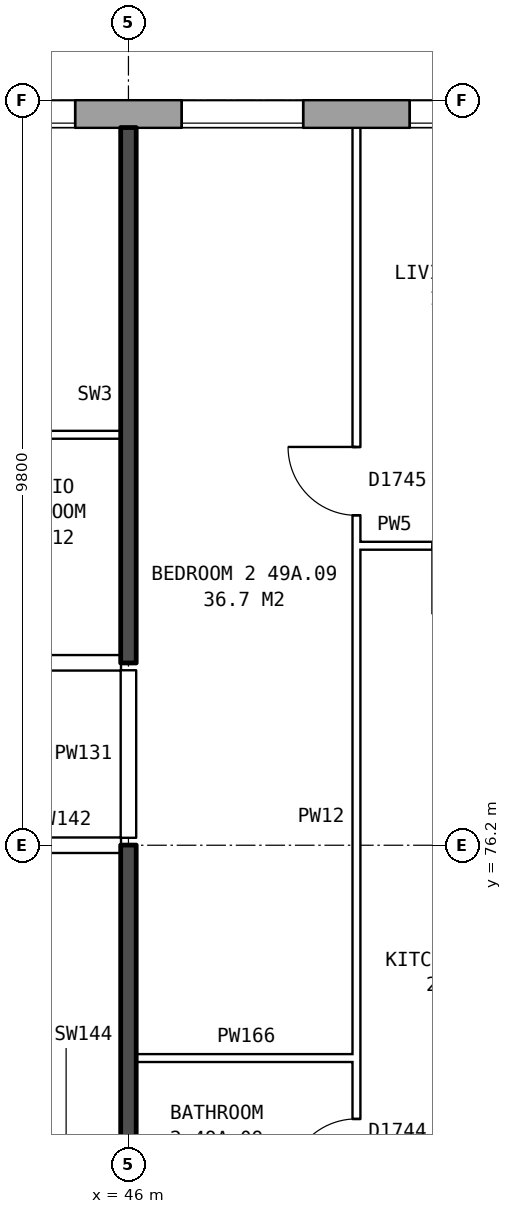
"""IFC4 building model, lengths in metres.
Left out: names, types, materials, properties, quantities, classifications, styles, units other than length and angle.
Written with IfcOpenShell. Run it as: python <this file> out.ifc"""

import sys

from ifc_helpers import new_model, si_unit, direction, frame, frame_2d, origin, place, context, subcontext, project, spatial, rectangle, extrude, element, fill, save


model = new_model("IFC4")
c1 = context("Model", 3, precision=1e-05, world=origin(), true_north=direction((0.0, 1.0)))
c2 = subcontext(c1, "Body", "Model", "MODEL_VIEW")
j1 = project(units=[si_unit("LENGTHUNIT", "METRE"), si_unit("PLANEANGLEUNIT", "RADIAN")], contexts=[c1])
p1 = place(None, origin())
s1 = spatial("IfcSite", under=j1, at=p1, CompositionType="ELEMENT")
p2 = place(p1, origin())
s2 = spatial("IfcBuilding", under=s1, at=p2, CompositionType="ELEMENT")
p3 = place(p2, frame((0.0, 0.0, 175.8)))
s3 = spatial("IfcBuildingStorey", under=s2, at=p3, CompositionType="ELEMENT", Elevation=175.8)
p4 = place(p3, frame((72.925, 85.82, 0.0), z_axis=(0.0, 0.0, 1.0), x_axis=(-1.0, 0.0, 0.0)))
e1 = element("IfcWall", 1, at=p4, inside=s3, PredefinedType="STANDARD", context=c2, shape_type="SweptSolid", body=[
    extrude(rectangle(XDim=39.601, YDim=0.36, at=frame_2d((19.8, 0.0))), origin(), (0.0, 0.0, 1.0), 2.85),
])
p5 = place(p4, frame((0.3, 0.0, 0.8)))
e2 = element("IfcOpeningElement", 2, at=p5, cuts=e1, PredefinedType="OPENING", context=c2, shape_type="SweptSolid", body=[
    extrude(rectangle(XDim=1.2, YDim=1.8, at=frame_2d((0.6, 0.9))), frame((0.0, 0.19, 0.0), z_axis=(0.0, -1.0, 0.0), x_axis=(1.0, 0.0, 0.0)), (0.0, 0.0, 1.0), 0.38),
])
p6 = place(p4, frame((3.675, 0.0, 0.8)))
e3 = element("IfcOpeningElement", 3, at=p6, cuts=e1, PredefinedType="OPENING", context=c2, shape_type="SweptSolid", body=[
    extrude(rectangle(XDim=0.6, YDim=0.9, at=frame_2d((0.3, 0.45))), frame((0.0, 0.19, 0.0), z_axis=(0.0, -1.0, 0.0), x_axis=(1.0, 0.0, 0.0)), (0.0, 0.0, 1.0), 0.38),
])
p7 = place(p4, frame((6.625, 0.0, 0.8)))
e4 = element("IfcOpeningElement", 4, at=p7, cuts=e1, PredefinedType="OPENING", context=c2, shape_type="SweptSolid", body=[
    extrude(rectangle(XDim=1.6, YDim=1.8, at=frame_2d((0.8, 0.9))), frame((0.0, 0.19, 0.0), z_axis=(0.0, -1.0, 0.0), x_axis=(1.0, 0.0, 0.0)), (0.0, 0.0, 1.0), 0.38),
])
p8 = place(p4, frame((9.625, 0.0, 0.8)))
e5 = element("IfcOpeningElement", 5, at=p8, cuts=e1, PredefinedType="OPENING", context=c2, shape_type="SweptSolid", body=[
    extrude(rectangle(XDim=1.6, YDim=1.8, at=frame_2d((0.8, 0.9))), frame((0.0, 0.19, 0.0), z_axis=(0.0, -1.0, 0.0), x_axis=(1.0, 0.0, 0.0)), (0.0, 0.0, 1.0), 0.38),
])
p9 = place(p4, frame((12.625, 0.0, 0.8)))
e6 = element("IfcOpeningElement", 6, at=p9, cuts=e1, PredefinedType="OPENING", context=c2, shape_type="SweptSolid", body=[
    extrude(rectangle(XDim=1.6, YDim=1.8, at=frame_2d((0.8, 0.9))), frame((0.0, 0.19, 0.0), z_axis=(0.0, -1.0, 0.0), x_axis=(1.0, 0.0, 0.0)), (0.0, 0.0, 1.0), 0.38),
])
p10 = place(p4, frame((15.625, 0.0, 0.8)))
e7 = element("IfcOpeningElement", 7, at=p10, cuts=e1, PredefinedType="OPENING", context=c2, shape_type="SweptSolid", body=[
    extrude(rectangle(XDim=1.6, YDim=1.8, at=frame_2d((0.8, 0.9))), frame((0.0, 0.19, 0.0), z_axis=(0.0, -1.0, 0.0), x_axis=(1.0, 0.0, 0.0)), (0.0, 0.0, 1.0), 0.38),
])
p11 = place(p4, frame((18.625, 0.0, 0.8)))
e8 = element("IfcOpeningElement", 8, at=p11, cuts=e1, PredefinedType="OPENING", context=c2, shape_type="SweptSolid", body=[
    extrude(rectangle(XDim=1.6, YDim=1.8, at=frame_2d((0.8, 0.9))), frame((0.0, 0.19, 0.0), z_axis=(0.0, -1.0, 0.0), x_axis=(1.0, 0.0, 0.0)), (0.0, 0.0, 1.0), 0.38),
])
p12 = place(p4, frame((21.625, 0.0, 0.8)))
e9 = element("IfcOpeningElement", 9, at=p12, cuts=e1, PredefinedType="OPENING", context=c2, shape_type="SweptSolid", body=[
    extrude(rectangle(XDim=1.6, YDim=1.8, at=frame_2d((0.8, 0.9))), frame((0.0, 0.19, 0.0), z_axis=(0.0, -1.0, 0.0), x_axis=(1.0, 0.0, 0.0)), (0.0, 0.0, 1.0), 0.38),
])
p13 = place(p4, frame((24.625, 0.0, 0.8)))
e10 = element("IfcOpeningElement", 10, at=p13, cuts=e1, PredefinedType="OPENING", context=c2, shape_type="SweptSolid", body=[
    extrude(rectangle(XDim=1.6, YDim=1.8, at=frame_2d((0.8, 0.9))), frame((0.0, 0.19, 0.0), z_axis=(0.0, -1.0, 0.0), x_axis=(1.0, 0.0, 0.0)), (0.0, 0.0, 1.0), 0.38),
])
p14 = place(p4, frame((27.625, 0.0, 0.8)))
e11 = element("IfcOpeningElement", 11, at=p14, cuts=e1, PredefinedType="OPENING", context=c2, shape_type="SweptSolid", body=[
    extrude(rectangle(XDim=1.6, YDim=1.8, at=frame_2d((0.8, 0.9))), frame((0.0, 0.19, 0.0), z_axis=(0.0, -1.0, 0.0), x_axis=(1.0, 0.0, 0.0)), (0.0, 0.0, 1.0), 0.38),
])
p15 = place(p4, frame((30.625, 0.0, 0.8)))
e12 = element("IfcOpeningElement", 12, at=p15, cuts=e1, PredefinedType="OPENING", context=c2, shape_type="SweptSolid", body=[
    extrude(rectangle(XDim=1.6, YDim=1.8, at=frame_2d((0.8, 0.9))), frame((0.0, 0.19, 0.0), z_axis=(0.0, -1.0, 0.0), x_axis=(1.0, 0.0, 0.0)), (0.0, 0.0, 1.0), 0.38),
])
p16 = place(p4, frame((33.625, 0.0, 0.8)))
e13 = element("IfcOpeningElement", 13, at=p16, cuts=e1, PredefinedType="OPENING", context=c2, shape_type="SweptSolid", body=[
    extrude(rectangle(XDim=1.6, YDim=1.8, at=frame_2d((0.8, 0.9))), frame((0.0, 0.19, 0.0), z_axis=(0.0, -1.0, 0.0), x_axis=(1.0, 0.0, 0.0)), (0.0, 0.0, 1.0), 0.38),
])
p17 = place(p4, frame((37.025, 0.0, 1.7)))
e14 = element("IfcOpeningElement", 14, at=p17, cuts=e1, PredefinedType="OPENING", context=c2, shape_type="SweptSolid", body=[
    extrude(rectangle(XDim=0.8, YDim=0.9, at=frame_2d((0.4, 0.45))), frame((0.0, 0.19, 0.0), z_axis=(0.0, -1.0, 0.0), x_axis=(1.0, 0.0, 0.0)), (0.0, 0.0, 1.0), 0.38),
])
p18 = place(p4, frame((1.8, 0.0, 1.6)))
e15 = element("IfcOpeningElement", 15, at=p18, cuts=e1, PredefinedType="OPENING", context=c2, shape_type="SweptSolid", body=[
    extrude(rectangle(XDim=0.6, YDim=0.9, at=frame_2d((0.3, 0.45))), frame((0.0, 0.19, 0.0), z_axis=(0.0, -1.0, 0.0), x_axis=(1.0, 0.0, 0.0)), (0.0, 0.0, 1.0), 0.38),
])
p19 = place(p4, frame((4.575, 0.0, 0.8)))
e16 = element("IfcOpeningElement", 16, at=p19, cuts=e1, PredefinedType="OPENING", context=c2, shape_type="SweptSolid", body=[
    extrude(rectangle(XDim=1.6, YDim=1.8, at=frame_2d((0.8, 0.9))), frame((0.0, 0.19, 0.0), z_axis=(0.0, -1.0, 0.0), x_axis=(1.0, 0.0, 0.0)), (0.0, 0.0, 1.0), 0.38),
])
p20 = place(p4, frame((38.125, 0.0, 0.8)))
e17 = element("IfcOpeningElement", 17, at=p20, cuts=e1, PredefinedType="OPENING", context=c2, shape_type="SweptSolid", body=[
    extrude(rectangle(XDim=0.6, YDim=1.8, at=frame_2d((0.3, 0.9))), frame((0.0, 0.19, 0.0), z_axis=(0.0, -1.0, 0.0), x_axis=(1.0, 0.0, 0.0)), (0.0, 0.0, 1.0), 0.38),
])
p21 = place(p3, frame((46.1, 73.4, 0.0), z_axis=(0.0, 0.0, 1.0), x_axis=(1.0, 0.0, 0.0)))
e18 = element("IfcWall", 18, at=p21, inside=s3, PredefinedType="PARTITIONING", context=c2, shape_type="SweptSolid", body=[
    extrude(rectangle(XDim=2.9, YDim=0.1, at=frame_2d((1.45, 0.0))), origin(), (0.0, 0.0, 1.0), 2.85),
])
p22 = place(p3, frame((44.36, 76.2, 0.0), z_axis=(0.0, 0.0, 1.0), x_axis=(1.0, 0.0, 0.0)))
e19 = element("IfcWall", 19, at=p22, inside=s3, PredefinedType="PARTITIONING", context=c2, shape_type="SweptSolid", body=[
    extrude(rectangle(XDim=1.54, YDim=0.2, at=frame_2d((0.77, 0.0))), origin(), (0.0, 0.0, 1.0), 2.85),
])
p23 = place(p3, frame((30.61, 78.6, 0.0), z_axis=(0.0, 0.0, 1.0), x_axis=(1.0, 0.0, 0.0)))
e20 = element("IfcWall", 20, at=p23, inside=s3, PredefinedType="PARTITIONING", context=c2, shape_type="SweptSolid", body=[
    extrude(rectangle(XDim=15.29, YDim=0.2, at=frame_2d((7.645, 0.0))), origin(), (0.0, 0.0, 1.0), 2.85),
])
p24 = place(p23, frame((10.69, 0.0, 0.0)))
e21 = element("IfcOpeningElement", 21, at=p24, cuts=e20, PredefinedType="OPENING", context=c2, shape_type="SweptSolid", body=[
    extrude(rectangle(XDim=1.0, YDim=2.1, at=frame_2d((0.5, 1.05))), frame((0.0, 0.11, 0.0), z_axis=(0.0, -1.0, 0.0), x_axis=(1.0, 0.0, 0.0)), (0.0, 0.0, 1.0), 0.22),
])
p25 = place(p23, frame((5.89, 0.0, 0.0)))
e22 = element("IfcOpeningElement", 22, at=p25, cuts=e20, PredefinedType="OPENING", context=c2, shape_type="SweptSolid", body=[
    extrude(rectangle(XDim=1.0, YDim=2.1, at=frame_2d((0.5, 1.05))), frame((0.0, 0.11, 0.0), z_axis=(0.0, -1.0, 0.0), x_axis=(1.0, 0.0, 0.0)), (0.0, 0.0, 1.0), 0.22),
])
p26 = place(p3, frame((49.0, 80.14, 0.0), z_axis=(0.0, 0.0, 1.0), x_axis=(1.0, 0.0, 0.0)))
e23 = element("IfcWall", 23, at=p26, inside=s3, PredefinedType="PARTITIONING", context=c2, shape_type="SweptSolid", body=[
    extrude(rectangle(XDim=2.9, YDim=0.1, at=frame_2d((1.45, 0.0))), origin(), (0.0, 0.0, 1.0), 2.85),
])
p27 = place(p26, frame((1.0, 0.0, 0.0)))
e24 = element("IfcOpeningElement", 24, at=p27, cuts=e23, PredefinedType="OPENING", context=c2, shape_type="SweptSolid", body=[
    extrude(rectangle(XDim=0.9, YDim=2.1, at=frame_2d((0.45, 1.05))), frame((0.0, 0.06, 0.0), z_axis=(0.0, -1.0, 0.0), x_axis=(1.0, 0.0, 0.0)), (0.0, 0.0, 1.0), 0.12),
])
p28 = place(p3, frame((43.6, 81.6, 0.0), z_axis=(0.0, 0.0, 1.0), x_axis=(1.0, 0.0, 0.0)))
e25 = element("IfcWall", 25, at=p28, inside=s3, PredefinedType="PARTITIONING", context=c2, shape_type="SweptSolid", body=[
    extrude(rectangle(XDim=2.3, YDim=0.1, at=frame_2d((1.15, 0.0))), origin(), (0.0, 0.0, 1.0), 2.85),
])
p29 = place(p3, frame((46.0, 71.2, 0.0), z_axis=(0.0, 0.0, 1.0), x_axis=(0.0, 1.0, 0.0)))
e26 = element("IfcWall", 26, at=p29, inside=s3, PredefinedType="SOLIDWALL", context=c2, shape_type="SweptSolid", body=[
    extrude(rectangle(XDim=5.0, YDim=0.2, at=frame_2d((2.5, 0.0))), origin(), (0.0, 0.0, 1.0), 2.85),
])
p30 = place(p3, frame((46.0, 76.3, 0.0), z_axis=(0.0, 0.0, 1.0), x_axis=(0.0, 1.0, 0.0)))
e27 = element("IfcWall", 27, at=p30, inside=s3, PredefinedType="PARTITIONING", context=c2, shape_type="SweptSolid", body=[
    extrude(rectangle(XDim=2.2, YDim=0.2, at=frame_2d((1.1, 0.0))), origin(), (0.0, 0.0, 1.0), 2.85),
])
p31 = place(p3, frame((46.0, 78.6, 0.0), z_axis=(0.0, 0.0, 1.0), x_axis=(0.0, 1.0, 0.0)))
e28 = element("IfcWall", 28, at=p31, inside=s3, PredefinedType="SOLIDWALL", context=c2, shape_type="SweptSolid", body=[
    extrude(rectangle(XDim=7.04, YDim=0.2, at=frame_2d((3.52, 0.0))), origin(), (0.0, 0.0, 1.0), 2.85),
])
p32 = place(p3, frame((49.0, 71.3, 0.0), z_axis=(0.0, 0.0, 1.0), x_axis=(0.0, 1.0, 0.0)))
e29 = element("IfcWall", 29, at=p32, inside=s3, PredefinedType="PARTITIONING", context=c2, shape_type="SweptSolid", body=[
    extrude(rectangle(XDim=14.34, YDim=0.1, at=frame_2d((7.17, 0.0))), origin(), (0.0, 0.0, 1.0), 2.85),
])
p33 = place(p32, frame((9.24, 0.0, 0.0)))
e30 = element("IfcOpeningElement", 30, at=p33, cuts=e29, PredefinedType="OPENING", context=c2, shape_type="SweptSolid", body=[
    extrude(rectangle(XDim=0.9, YDim=2.1, at=frame_2d((0.45, 1.05))), frame((0.0, 0.06, 0.0), z_axis=(0.0, -1.0, 0.0), x_axis=(1.0, 0.0, 0.0)), (0.0, 0.0, 1.0), 0.12),
])
p34 = place(p32, frame((0.4, 0.0, 0.0)))
e31 = element("IfcOpeningElement", 31, at=p34, cuts=e29, PredefinedType="OPENING", context=c2, shape_type="SweptSolid", body=[
    extrude(rectangle(XDim=0.9, YDim=2.1, at=frame_2d((0.45, 1.05))), frame((0.0, 0.06, 0.0), z_axis=(0.0, -1.0, 0.0), x_axis=(1.0, 0.0, 0.0)), (0.0, 0.0, 1.0), 0.12),
])
p35 = place(p12, origin())
e32 = element("IfcWindow", 32, at=p35, inside=s3, PartitioningType="SINGLE_PANEL", PredefinedType="WINDOW", context=c2, shape_type="SweptSolid", body=[
    extrude(rectangle(XDim=1.6, YDim=1.8, at=frame_2d((0.8, 0.9))), frame((0.0, 0.15, 0.0), z_axis=(0.0, -1.0, 0.0), x_axis=(1.0, 0.0, 0.0)), (0.0, 0.0, 1.0), 0.06),
])
fill(e9, e32)
p36 = place(p13, origin())
e33 = element("IfcWindow", 33, at=p36, inside=s3, PartitioningType="SINGLE_PANEL", PredefinedType="WINDOW", context=c2, shape_type="SweptSolid", body=[
    extrude(rectangle(XDim=1.6, YDim=1.8, at=frame_2d((0.8, 0.9))), frame((0.0, 0.15, 0.0), z_axis=(0.0, -1.0, 0.0), x_axis=(1.0, 0.0, 0.0)), (0.0, 0.0, 1.0), 0.06),
])
fill(e10, e33)
p37 = place(p14, origin())
e34 = element("IfcWindow", 34, at=p37, inside=s3, PartitioningType="SINGLE_PANEL", PredefinedType="WINDOW", context=c2, shape_type="SweptSolid", body=[
    extrude(rectangle(XDim=1.6, YDim=1.8, at=frame_2d((0.8, 0.9))), frame((0.0, 0.15, 0.0), z_axis=(0.0, -1.0, 0.0), x_axis=(1.0, 0.0, 0.0)), (0.0, 0.0, 1.0), 0.06),
])
fill(e11, e34)
p38 = place(p33, origin())
e35 = element("IfcDoor", 35, at=p38, inside=s3, OperationType="SINGLE_SWING_RIGHT", PredefinedType="DOOR", context=c2, shape_type="SweptSolid", body=[
    extrude(rectangle(XDim=0.9, YDim=2.1, at=frame_2d((0.45, 1.05))), frame((0.0, 0.025, 0.0), z_axis=(0.0, -1.0, 0.0), x_axis=(1.0, 0.0, 0.0)), (0.0, 0.0, 1.0), 0.05),
])
fill(e30, e35)
p39 = place(p34, origin())
e36 = element("IfcDoor", 36, at=p39, inside=s3, OperationType="SINGLE_SWING_LEFT", PredefinedType="DOOR", context=c2, shape_type="SweptSolid", body=[
    extrude(rectangle(XDim=0.9, YDim=2.1, at=frame_2d((0.45, 1.05))), frame((0.0, 0.025, 0.0), z_axis=(0.0, -1.0, 0.0), x_axis=(1.0, 0.0, 0.0)), (0.0, 0.0, 1.0), 0.05),
])
fill(e31, e36)
save(model, sys.argv[1])
